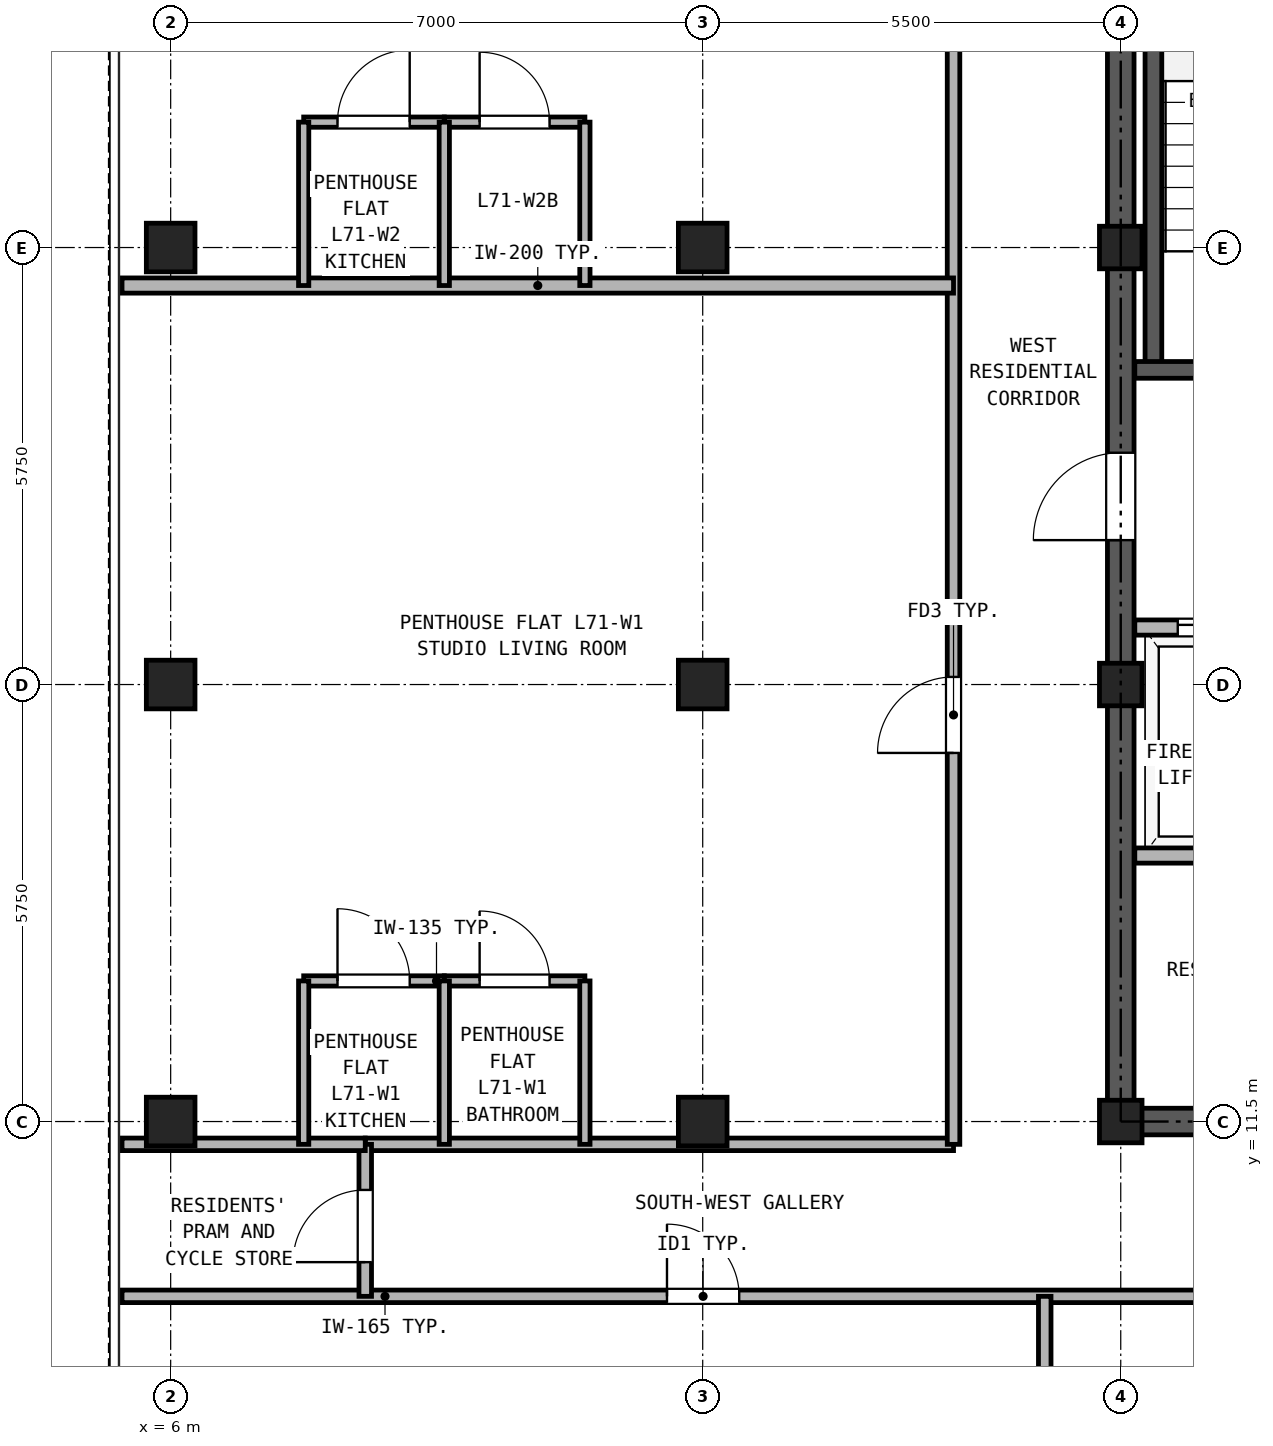
"""IFC4 building model, lengths in metres.
Left out: names, types, materials, properties, quantities, classifications, styles, units other than length and angle.
Written with IfcOpenShell. Run it as: python <this file> out.ifc"""

import sys

from ifc_helpers import new_model, si_unit, direction, frame, frame_2d, origin, origin_2d, place, context, subcontext, project, spatial, rectangle, hollow_rectangle, extrude, source, transform, mapped, element, fill, save


model = new_model("IFC4")
c1 = context("Model", 3, precision=1e-05, world=origin(), true_north=direction((0.0, 1.0)))
c2 = subcontext(c1, "Body", "Model", "MODEL_VIEW")
j1 = project(units=[si_unit("LENGTHUNIT", "METRE"), si_unit("PLANEANGLEUNIT", "RADIAN")], contexts=[c1])
p1 = place(None, origin())
s1 = spatial("IfcSite", under=j1, at=p1, CompositionType="ELEMENT")
p2 = place(p1, origin())
s2 = spatial("IfcBuilding", under=s1, at=p2, CompositionType="ELEMENT")
p3 = place(p2, frame((0.0, 0.0, 248.9)))
s3 = spatial("IfcBuildingStorey", under=s2, at=p3, CompositionType="ELEMENT", Elevation=248.9)
m1 = source(origin(), c2, "Body", "SweptSolid", [
    extrude(hollow_rectangle(XDim=0.64, YDim=0.64, WallThickness=0.035, at=origin_2d()), origin(), (0.0, 0.0, 1.0), 2.98),
])
for number, where, z_axis, x_axis in (
    (1, (6.0, 11.5, 0.0), (0.0, 0.0, 1.0), (1.0, 0.0, 0.0)),
    (2, (6.0, 17.25, 0.0), (0.0, 0.0, 1.0), (1.0, 0.0, 0.0)),
    (3, (6.0, 23.0, 0.0), (0.0, 0.0, 1.0), (1.0, 0.0, 0.0)),
    (4, (13.0, 11.5, 0.0), (0.0, 0.0, 1.0), (1.0, 0.0, 0.0)),
    (5, (13.0, 17.25, 0.0), (0.0, 0.0, 1.0), (1.0, 0.0, 0.0)),
    (6, (13.0, 23.0, 0.0), (0.0, 0.0, 1.0), (1.0, 0.0, 0.0)),
):
    element("IfcColumn", number, at=place(p3, frame(where, z_axis=z_axis, x_axis=x_axis)), inside=s3, PredefinedType="COLUMN", context=c2, shape_type="MappedRepresentation", body=[
        mapped(m1, transform((0.0, 0.0, 0.0), x_axis=(1.0, 0.0, 0.0), y_axis=(0.0, 1.0, 0.0), z_axis=(0.0, 0.0, 1.0), scale=1.0)),
    ])
m2 = source(origin(), c2, "Body", "SweptSolid", [
    extrude(hollow_rectangle(XDim=0.56, YDim=0.56, WallThickness=0.03, at=origin_2d()), origin(), (0.0, 0.0, 1.0), 2.98),
])
for number, where, z_axis, x_axis in (
    (7, (18.5, 11.5, 0.0), (0.0, 0.0, 1.0), (1.0, 0.0, 0.0)),
    (8, (18.5, 17.25, 0.0), (0.0, 0.0, 1.0), (1.0, 0.0, 0.0)),
    (9, (18.5, 23.0, 0.0), (0.0, 0.0, 1.0), (1.0, 0.0, 0.0)),
):
    element("IfcColumn", number, at=place(p3, frame(where, z_axis=z_axis, x_axis=x_axis)), inside=s3, PredefinedType="COLUMN", context=c2, shape_type="MappedRepresentation", body=[
        mapped(m2, transform((0.0, 0.0, 0.0), x_axis=(1.0, 0.0, 0.0), y_axis=(0.0, 1.0, 0.0), z_axis=(0.0, 0.0, 1.0), scale=1.0)),
    ])
p4 = place(p3, frame((18.325, 11.5, 0.0), z_axis=(0.0, 0.0, 1.0), x_axis=(1.0, 0.0, 0.0)))
e10 = element("IfcWall", 10, at=p4, inside=s3, PredefinedType="SHEAR", context=c2, shape_type="SweptSolid", body=[
    extrude(rectangle(XDim=10.35, YDim=0.35, at=frame_2d((5.175, 0.0))), origin(), (0.0, 0.0, 1.0), 2.98),
])
p5 = place(p4, frame((1.775, 0.0, 0.0)))
e11 = element("IfcOpeningElement", 11, at=p5, cuts=e10, PredefinedType="OPENING", context=c2, shape_type="SweptSolid", body=[
    extrude(rectangle(XDim=0.95, YDim=2.15, at=frame_2d((0.475, 1.075))), frame((0.0, 0.185, 0.0), z_axis=(0.0, -1.0, 0.0), x_axis=(1.0, 0.0, 0.0)), (0.0, 0.0, 1.0), 0.37),
])
p6 = place(p4, frame((5.275, 0.0, 0.0)))
e12 = element("IfcOpeningElement", 12, at=p6, cuts=e10, PredefinedType="OPENING", context=c2, shape_type="SweptSolid", body=[
    extrude(rectangle(XDim=0.95, YDim=2.15, at=frame_2d((0.475, 1.075))), frame((0.0, 0.185, 0.0), z_axis=(0.0, -1.0, 0.0), x_axis=(1.0, 0.0, 0.0)), (0.0, 0.0, 1.0), 0.37),
])
p7 = place(p4, frame((8.175, 0.0, 0.0)))
e13 = element("IfcOpeningElement", 13, at=p7, cuts=e10, PredefinedType="OPENING", context=c2, shape_type="SweptSolid", body=[
    extrude(rectangle(XDim=1.1, YDim=2.25, at=frame_2d((0.55, 1.125))), frame((0.0, 0.185, 0.0), z_axis=(0.0, -1.0, 0.0), x_axis=(1.0, 0.0, 0.0)), (0.0, 0.0, 1.0), 0.37),
])
p8 = place(p3, frame((18.5, 11.675, 0.0), z_axis=(0.0, 0.0, 1.0), x_axis=(0.0, 1.0, 0.0)))
e14 = element("IfcWall", 14, at=p8, inside=s3, PredefinedType="SHEAR", context=c2, shape_type="SweptSolid", body=[
    extrude(rectangle(XDim=16.9, YDim=0.35, at=frame_2d((8.45, 0.0))), origin(), (0.0, 0.0, 1.0), 2.98),
])
p9 = place(p8, frame((7.475, 0.0, 0.0)))
e15 = element("IfcOpeningElement", 15, at=p9, cuts=e14, PredefinedType="OPENING", context=c2, shape_type="SweptSolid", body=[
    extrude(rectangle(XDim=1.15, YDim=2.2, at=frame_2d((0.575, 1.1))), frame((0.0, 0.185, 0.0), z_axis=(0.0, -1.0, 0.0), x_axis=(1.0, 0.0, 0.0)), (0.0, 0.0, 1.0), 0.37),
])
p10 = place(p3, frame((18.93, 21.39, 0.0), z_axis=(0.0, 0.0, 1.0), x_axis=(0.0, 1.0, 0.0)))
e16 = element("IfcWall", 16, at=p10, inside=s3, PredefinedType="SOLIDWALL", context=c2, shape_type="SweptSolid", body=[
    extrude(rectangle(XDim=7.11, YDim=0.22, at=frame_2d((3.555, 0.0))), origin(), (0.0, 0.0, 1.0), 2.98),
])
p11 = place(p3, frame((18.685, 21.39, 0.0), z_axis=(0.0, 0.0, 1.0), x_axis=(1.0, 0.0, 0.0)))
e17 = element("IfcWall", 17, at=p11, inside=s3, PredefinedType="SOLIDWALL", context=c2, shape_type="SweptSolid", body=[
    extrude(rectangle(XDim=6.445, YDim=0.22, at=frame_2d((3.222, 0.0))), origin(), (0.0, 0.0, 1.0), 2.98),
])
p12 = place(p11, frame((1.165, 0.0, 0.0)))
e18 = element("IfcOpeningElement", 18, at=p12, cuts=e17, PredefinedType="OPENING", context=c2, shape_type="SweptSolid", body=[
    extrude(rectangle(XDim=1.15, YDim=2.2, at=frame_2d((0.575, 1.1))), frame((0.0, 0.12, 0.0), z_axis=(0.0, -1.0, 0.0), x_axis=(1.0, 0.0, 0.0)), (0.0, 0.0, 1.0), 0.24),
])
p13 = place(p11, frame((4.895, 0.0, 0.0)))
e19 = element("IfcOpeningElement", 19, at=p13, cuts=e17, PredefinedType="OPENING", context=c2, shape_type="SweptSolid", body=[
    extrude(rectangle(XDim=1.1, YDim=2.25, at=frame_2d((0.55, 1.125))), frame((0.0, 0.12, 0.0), z_axis=(0.0, -1.0, 0.0), x_axis=(1.0, 0.0, 0.0)), (0.0, 0.0, 1.0), 0.24),
])
p14 = place(p3, frame((18.685, 18.0, 0.0), z_axis=(0.0, 0.0, 1.0), x_axis=(1.0, 0.0, 0.0)))
e20 = element("IfcWall", 20, at=p14, inside=s3, PredefinedType="PARTITIONING", context=c2, shape_type="SweptSolid", body=[
    extrude(rectangle(XDim=9.63, YDim=0.2, at=frame_2d((4.815, 0.0))), origin(), (0.0, 0.0, 1.0), 2.98),
])
p15 = place(p14, frame((0.565, 0.0, 0.0)))
e21 = element("IfcOpeningElement", 21, at=p15, cuts=e20, PredefinedType="OPENING", context=c2, shape_type="SweptSolid", body=[
    extrude(rectangle(XDim=1.3, YDim=2.3, at=frame_2d((0.65, 1.15))), frame((0.0, 0.11, 0.0), z_axis=(0.0, -1.0, 0.0), x_axis=(1.0, 0.0, 0.0)), (0.0, 0.0, 1.0), 0.22),
])
p16 = place(p14, frame((2.665, 0.0, 0.0)))
e22 = element("IfcOpeningElement", 22, at=p16, cuts=e20, PredefinedType="OPENING", context=c2, shape_type="SweptSolid", body=[
    extrude(rectangle(XDim=1.3, YDim=2.3, at=frame_2d((0.65, 1.15))), frame((0.0, 0.11, 0.0), z_axis=(0.0, -1.0, 0.0), x_axis=(1.0, 0.0, 0.0)), (0.0, 0.0, 1.0), 0.22),
])
p17 = place(p14, frame((5.085, 0.0, 0.0)))
e23 = element("IfcOpeningElement", 23, at=p17, cuts=e20, PredefinedType="OPENING", context=c2, shape_type="SweptSolid", body=[
    extrude(rectangle(XDim=0.9, YDim=2.05, at=frame_2d((0.45, 1.025))), frame((0.0, 0.11, 0.0), z_axis=(0.0, -1.0, 0.0), x_axis=(1.0, 0.0, 0.0)), (0.0, 0.0, 1.0), 0.22),
])
p18 = place(p14, frame((8.215, 0.0, 0.0)))
e24 = element("IfcOpeningElement", 24, at=p18, cuts=e20, PredefinedType="OPENING", context=c2, shape_type="SweptSolid", body=[
    extrude(rectangle(XDim=0.9, YDim=2.05, at=frame_2d((0.45, 1.025))), frame((0.0, 0.11, 0.0), z_axis=(0.0, -1.0, 0.0), x_axis=(1.0, 0.0, 0.0)), (0.0, 0.0, 1.0), 0.22),
])
p19 = place(p3, frame((18.685, 15.0, 0.0), z_axis=(0.0, 0.0, 1.0), x_axis=(1.0, 0.0, 0.0)))
e25 = element("IfcWall", 25, at=p19, inside=s3, PredefinedType="PARTITIONING", context=c2, shape_type="SweptSolid", body=[
    extrude(rectangle(XDim=9.63, YDim=0.2, at=frame_2d((4.815, 0.0))), origin(), (0.0, 0.0, 1.0), 2.98),
])
p20 = place(p3, frame((5.36, 9.2, 0.0), z_axis=(0.0, 0.0, 1.0), x_axis=(1.0, 0.0, 0.0)))
e26 = element("IfcWall", 26, at=p20, inside=s3, PredefinedType="PARTITIONING", context=c2, shape_type="SweptSolid", body=[
    extrude(rectangle(XDim=36.28, YDim=0.165, at=frame_2d((18.14, 0.0))), origin(), (0.0, 0.0, 1.0), 2.98),
])
p21 = place(p20, frame((7.17, 0.0, 0.0)))
e27 = element("IfcOpeningElement", 27, at=p21, cuts=e26, PredefinedType="OPENING", context=c2, shape_type="SweptSolid", body=[
    extrude(rectangle(XDim=0.95, YDim=2.15, at=frame_2d((0.475, 1.075))), frame((0.0, 0.093, 0.0), z_axis=(0.0, -1.0, 0.0), x_axis=(1.0, 0.0, 0.0)), (0.0, 0.0, 1.0), 0.185),
])
p22 = place(p20, frame((15.39, 0.0, 0.0)))
e28 = element("IfcOpeningElement", 28, at=p22, cuts=e26, PredefinedType="OPENING", context=c2, shape_type="SweptSolid", body=[
    extrude(rectangle(XDim=0.95, YDim=2.15, at=frame_2d((0.475, 1.075))), frame((0.0, 0.093, 0.0), z_axis=(0.0, -1.0, 0.0), x_axis=(1.0, 0.0, 0.0)), (0.0, 0.0, 1.0), 0.185),
])
p23 = place(p20, frame((22.39, 0.0, 0.0)))
e29 = element("IfcOpeningElement", 29, at=p23, cuts=e26, PredefinedType="OPENING", context=c2, shape_type="SweptSolid", body=[
    extrude(rectangle(XDim=0.95, YDim=2.15, at=frame_2d((0.475, 1.075))), frame((0.0, 0.093, 0.0), z_axis=(0.0, -1.0, 0.0), x_axis=(1.0, 0.0, 0.0)), (0.0, 0.0, 1.0), 0.185),
])
p24 = place(p20, frame((28.99, 0.0, 0.0)))
e30 = element("IfcOpeningElement", 30, at=p24, cuts=e26, PredefinedType="OPENING", context=c2, shape_type="SweptSolid", body=[
    extrude(rectangle(XDim=0.95, YDim=2.15, at=frame_2d((0.475, 1.075))), frame((0.0, 0.093, 0.0), z_axis=(0.0, -1.0, 0.0), x_axis=(1.0, 0.0, 0.0)), (0.0, 0.0, 1.0), 0.185),
])
p25 = place(p3, frame((8.56, 11.2, 0.0), z_axis=(0.0, 0.0, 1.0), x_axis=(1.0, 0.0, 0.0)))
e31 = element("IfcWall", 31, at=p25, inside=s3, PredefinedType="PARTITIONING", context=c2, shape_type="SweptSolid", body=[
    extrude(rectangle(XDim=7.74, YDim=0.165, at=frame_2d((3.87, 0.0))), origin(), (0.0, 0.0, 1.0), 2.98),
])
p26 = place(p3, frame((8.56, 9.2, 0.0), z_axis=(0.0, 0.0, 1.0), x_axis=(0.0, 1.0, 0.0)))
e32 = element("IfcWall", 32, at=p26, inside=s3, PredefinedType="PARTITIONING", context=c2, shape_type="SweptSolid", body=[
    extrude(rectangle(XDim=2.0, YDim=0.165, at=frame_2d((1.0, 0.0))), origin(), (0.0, 0.0, 1.0), 2.98),
])
p27 = place(p26, frame((0.45, 0.0, 0.0)))
e33 = element("IfcOpeningElement", 33, at=p27, cuts=e32, PredefinedType="OPENING", context=c2, shape_type="SweptSolid", body=[
    extrude(rectangle(XDim=0.95, YDim=2.15, at=frame_2d((0.475, 1.075))), frame((0.0, 0.093, 0.0), z_axis=(0.0, -1.0, 0.0), x_axis=(1.0, 0.0, 0.0)), (0.0, 0.0, 1.0), 0.185),
])
p28 = place(p3, frame((16.3, 11.2, 0.0), z_axis=(0.0, 0.0, 1.0), x_axis=(0.0, 1.0, 0.0)))
e34 = element("IfcWall", 34, at=p28, inside=s3, PredefinedType="PARTITIONING", context=c2, shape_type="SweptSolid", body=[
    extrude(rectangle(XDim=23.94, YDim=0.165, at=frame_2d((11.97, 0.0))), origin(), (0.0, 0.0, 1.0), 2.98),
])
p29 = place(p28, frame((5.15, 0.0, 0.0)))
e35 = element("IfcOpeningElement", 35, at=p29, cuts=e34, PredefinedType="OPENING", context=c2, shape_type="SweptSolid", body=[
    extrude(rectangle(XDim=1.0, YDim=2.15, at=frame_2d((0.5, 1.075))), frame((0.0, 0.093, 0.0), z_axis=(0.0, -1.0, 0.0), x_axis=(1.0, 0.0, 0.0)), (0.0, 0.0, 1.0), 0.185),
])
p30 = place(p28, frame((14.7, 0.0, 0.0)))
e36 = element("IfcOpeningElement", 36, at=p30, cuts=e34, PredefinedType="OPENING", context=c2, shape_type="SweptSolid", body=[
    extrude(rectangle(XDim=1.0, YDim=2.15, at=frame_2d((0.5, 1.075))), frame((0.0, 0.093, 0.0), z_axis=(0.0, -1.0, 0.0), x_axis=(1.0, 0.0, 0.0)), (0.0, 0.0, 1.0), 0.185),
])
p31 = place(p3, frame((17.5, 0.16, 0.0), z_axis=(0.0, 0.0, 1.0), x_axis=(0.0, 1.0, 0.0)))
e37 = element("IfcWall", 37, at=p31, inside=s3, PredefinedType="PARTITIONING", context=c2, shape_type="SweptSolid", body=[
    extrude(rectangle(XDim=9.04, YDim=0.165, at=frame_2d((4.52, 0.0))), origin(), (0.0, 0.0, 1.0), 2.98),
])
p32 = place(p3, frame((5.36, 11.2, 0.0), z_axis=(0.0, 0.0, 1.0), x_axis=(1.0, 0.0, 0.0)))
e38 = element("IfcWall", 38, at=p32, inside=s3, PredefinedType="PARTITIONING", context=c2, shape_type="SweptSolid", body=[
    extrude(rectangle(XDim=3.2, YDim=0.165, at=frame_2d((1.6, 0.0))), origin(), (0.0, 0.0, 1.0), 2.98),
])
p33 = place(p3, frame((7.75, 13.35, 0.0), z_axis=(0.0, 0.0, 1.0), x_axis=(1.0, 0.0, 0.0)))
e39 = element("IfcWall", 39, at=p33, inside=s3, PredefinedType="PARTITIONING", context=c2, shape_type="SweptSolid", body=[
    extrude(rectangle(XDim=1.85, YDim=0.135, at=frame_2d((0.925, 0.0))), origin(), (0.0, 0.0, 1.0), 2.98),
])
p34 = place(p33, frame((0.445, 0.0, 0.0)))
e40 = element("IfcOpeningElement", 40, at=p34, cuts=e39, PredefinedType="OPENING", context=c2, shape_type="SweptSolid", body=[
    extrude(rectangle(XDim=0.95, YDim=2.15, at=frame_2d((0.475, 1.075))), frame((0.0, 0.077, 0.0), z_axis=(0.0, -1.0, 0.0), x_axis=(1.0, 0.0, 0.0)), (0.0, 0.0, 1.0), 0.155),
])
p35 = place(p3, frame((9.6, 13.35, 0.0), z_axis=(0.0, 0.0, 1.0), x_axis=(1.0, 0.0, 0.0)))
e41 = element("IfcWall", 41, at=p35, inside=s3, PredefinedType="PARTITIONING", context=c2, shape_type="SweptSolid", body=[
    extrude(rectangle(XDim=1.85, YDim=0.135, at=frame_2d((0.925, 0.0))), origin(), (0.0, 0.0, 1.0), 2.98),
])
p36 = place(p35, frame((0.465, 0.0, 0.0)))
e42 = element("IfcOpeningElement", 42, at=p36, cuts=e41, PredefinedType="OPENING", context=c2, shape_type="SweptSolid", body=[
    extrude(rectangle(XDim=0.92, YDim=2.1, at=frame_2d((0.46, 1.05))), frame((0.0, 0.077, 0.0), z_axis=(0.0, -1.0, 0.0), x_axis=(1.0, 0.0, 0.0)), (0.0, 0.0, 1.0), 0.155),
])
for number, where, z_axis, x_axis in (
    (43, (7.75, 11.2, 0.0), (0.0, 0.0, 1.0), (0.0, 1.0, 0.0)),
    (44, (9.6, 11.2, 0.0), (0.0, 0.0, 1.0), (0.0, 1.0, 0.0)),
    (45, (11.45, 11.2, 0.0), (0.0, 0.0, 1.0), (0.0, 1.0, 0.0)),
):
    element("IfcWall", number, at=place(p3, frame(where, z_axis=z_axis, x_axis=x_axis)), inside=s3, PredefinedType="PARTITIONING", context=c2, shape_type="SweptSolid", body=[
        extrude(rectangle(XDim=2.15, YDim=0.135, at=frame_2d((1.075, 0.0))), origin(), (0.0, 0.0, 1.0), 2.98),
    ])
p37 = place(p3, frame((5.36, 22.5, 0.0), z_axis=(0.0, 0.0, 1.0), x_axis=(1.0, 0.0, 0.0)))
e46 = element("IfcWall", 46, at=p37, inside=s3, PredefinedType="PARTITIONING", context=c2, shape_type="SweptSolid", body=[
    extrude(rectangle(XDim=10.94, YDim=0.2, at=frame_2d((5.47, 0.0))), origin(), (0.0, 0.0, 1.0), 2.98),
])
p38 = place(p3, frame((7.75, 24.65, 0.0), z_axis=(0.0, 0.0, 1.0), x_axis=(1.0, 0.0, 0.0)))
e47 = element("IfcWall", 47, at=p38, inside=s3, PredefinedType="PARTITIONING", context=c2, shape_type="SweptSolid", body=[
    extrude(rectangle(XDim=1.85, YDim=0.135, at=frame_2d((0.925, 0.0))), origin(), (0.0, 0.0, 1.0), 2.98),
])
p39 = place(p38, frame((0.445, 0.0, 0.0)))
e48 = element("IfcOpeningElement", 48, at=p39, cuts=e47, PredefinedType="OPENING", context=c2, shape_type="SweptSolid", body=[
    extrude(rectangle(XDim=0.95, YDim=2.15, at=frame_2d((0.475, 1.075))), frame((0.0, 0.077, 0.0), z_axis=(0.0, -1.0, 0.0), x_axis=(1.0, 0.0, 0.0)), (0.0, 0.0, 1.0), 0.155),
])
p40 = place(p3, frame((9.6, 24.65, 0.0), z_axis=(0.0, 0.0, 1.0), x_axis=(1.0, 0.0, 0.0)))
e49 = element("IfcWall", 49, at=p40, inside=s3, PredefinedType="PARTITIONING", context=c2, shape_type="SweptSolid", body=[
    extrude(rectangle(XDim=1.85, YDim=0.135, at=frame_2d((0.925, 0.0))), origin(), (0.0, 0.0, 1.0), 2.98),
])
p41 = place(p40, frame((0.465, 0.0, 0.0)))
e50 = element("IfcOpeningElement", 50, at=p41, cuts=e49, PredefinedType="OPENING", context=c2, shape_type="SweptSolid", body=[
    extrude(rectangle(XDim=0.92, YDim=2.1, at=frame_2d((0.46, 1.05))), frame((0.0, 0.077, 0.0), z_axis=(0.0, -1.0, 0.0), x_axis=(1.0, 0.0, 0.0)), (0.0, 0.0, 1.0), 0.155),
])
for number, where, z_axis, x_axis in (
    (51, (7.75, 22.5, 0.0), (0.0, 0.0, 1.0), (0.0, 1.0, 0.0)),
    (52, (9.6, 22.5, 0.0), (0.0, 0.0, 1.0), (0.0, 1.0, 0.0)),
    (53, (11.45, 22.5, 0.0), (0.0, 0.0, 1.0), (0.0, 1.0, 0.0)),
):
    element("IfcWall", number, at=place(p3, frame(where, z_axis=z_axis, x_axis=x_axis)), inside=s3, PredefinedType="PARTITIONING", context=c2, shape_type="SweptSolid", body=[
        extrude(rectangle(XDim=2.15, YDim=0.135, at=frame_2d((1.075, 0.0))), origin(), (0.0, 0.0, 1.0), 2.98),
    ])
p42 = place(p15, origin())
e54 = element("IfcDoor", 54, at=p42, inside=s3, OperationType="DOUBLE_DOOR_SLIDING", PredefinedType="DOOR", context=c2, shape_type="SweptSolid", body=[
    extrude(rectangle(XDim=1.3, YDim=2.3, at=frame_2d((0.65, 1.15))), frame((0.0, 0.025, 0.0), z_axis=(0.0, -1.0, 0.0), x_axis=(1.0, 0.0, 0.0)), (0.0, 0.0, 1.0), 0.05),
])
fill(e21, e54)
p43 = place(p9, frame((1.15, 0.0, 0.0), z_axis=(0.0, 0.0, 1.0), x_axis=(-1.0, 0.0, 0.0)))
e55 = element("IfcDoor", 55, at=p43, inside=s3, OperationType="SINGLE_SWING_LEFT", PredefinedType="DOOR", context=c2, shape_type="SweptSolid", body=[
    extrude(rectangle(XDim=1.15, YDim=2.2, at=frame_2d((0.575, 1.1))), frame((0.0, 0.025, 0.0), z_axis=(0.0, -1.0, 0.0), x_axis=(1.0, 0.0, 0.0)), (0.0, 0.0, 1.0), 0.05),
])
fill(e15, e55)
p44 = place(p21, frame((0.95, 0.0, 0.0), z_axis=(0.0, 0.0, 1.0), x_axis=(-1.0, 0.0, 0.0)))
e56 = element("IfcDoor", 56, at=p44, inside=s3, OperationType="SINGLE_SWING_LEFT", PredefinedType="DOOR", context=c2, shape_type="SweptSolid", body=[
    extrude(rectangle(XDim=0.95, YDim=2.15, at=frame_2d((0.475, 1.075))), frame((0.0, 0.025, 0.0), z_axis=(0.0, -1.0, 0.0), x_axis=(1.0, 0.0, 0.0)), (0.0, 0.0, 1.0), 0.05),
])
fill(e27, e56)
p45 = place(p27, frame((0.95, 0.0, 0.0), z_axis=(0.0, 0.0, 1.0), x_axis=(-1.0, 0.0, 0.0)))
e57 = element("IfcDoor", 57, at=p45, inside=s3, OperationType="SINGLE_SWING_LEFT", PredefinedType="DOOR", context=c2, shape_type="SweptSolid", body=[
    extrude(rectangle(XDim=0.95, YDim=2.15, at=frame_2d((0.475, 1.075))), frame((0.0, 0.025, 0.0), z_axis=(0.0, -1.0, 0.0), x_axis=(1.0, 0.0, 0.0)), (0.0, 0.0, 1.0), 0.05),
])
fill(e33, e57)
p46 = place(p34, origin())
e58 = element("IfcDoor", 58, at=p46, inside=s3, OperationType="SINGLE_SWING_LEFT", PredefinedType="DOOR", context=c2, shape_type="SweptSolid", body=[
    extrude(rectangle(XDim=0.95, YDim=2.15, at=frame_2d((0.475, 1.075))), frame((0.0, 0.025, 0.0), z_axis=(0.0, -1.0, 0.0), x_axis=(1.0, 0.0, 0.0)), (0.0, 0.0, 1.0), 0.05),
])
fill(e40, e58)
p47 = place(p36, origin())
e59 = element("IfcDoor", 59, at=p47, inside=s3, OperationType="SINGLE_SWING_LEFT", PredefinedType="DOOR", context=c2, shape_type="SweptSolid", body=[
    extrude(rectangle(XDim=0.92, YDim=2.1, at=frame_2d((0.46, 1.05))), frame((0.0, 0.025, 0.0), z_axis=(0.0, -1.0, 0.0), x_axis=(1.0, 0.0, 0.0)), (0.0, 0.0, 1.0), 0.05),
])
fill(e42, e59)
p48 = place(p29, origin())
e60 = element("IfcDoor", 60, at=p48, inside=s3, OperationType="SINGLE_SWING_LEFT", PredefinedType="DOOR", context=c2, shape_type="SweptSolid", body=[
    extrude(rectangle(XDim=1.0, YDim=2.15, at=frame_2d((0.5, 1.075))), frame((0.0, 0.025, 0.0), z_axis=(0.0, -1.0, 0.0), x_axis=(1.0, 0.0, 0.0)), (0.0, 0.0, 1.0), 0.05),
])
fill(e35, e60)
p49 = place(p39, origin())
e61 = element("IfcDoor", 61, at=p49, inside=s3, OperationType="SINGLE_SWING_RIGHT", PredefinedType="DOOR", context=c2, shape_type="SweptSolid", body=[
    extrude(rectangle(XDim=0.95, YDim=2.15, at=frame_2d((0.475, 1.075))), frame((0.0, 0.025, 0.0), z_axis=(0.0, -1.0, 0.0), x_axis=(1.0, 0.0, 0.0)), (0.0, 0.0, 1.0), 0.05),
])
fill(e48, e61)
p50 = place(p41, origin())
e62 = element("IfcDoor", 62, at=p50, inside=s3, OperationType="SINGLE_SWING_LEFT", PredefinedType="DOOR", context=c2, shape_type="SweptSolid", body=[
    extrude(rectangle(XDim=0.92, YDim=2.1, at=frame_2d((0.46, 1.05))), frame((0.0, 0.025, 0.0), z_axis=(0.0, -1.0, 0.0), x_axis=(1.0, 0.0, 0.0)), (0.0, 0.0, 1.0), 0.05),
])
fill(e50, e62)
save(model, sys.argv[1])
